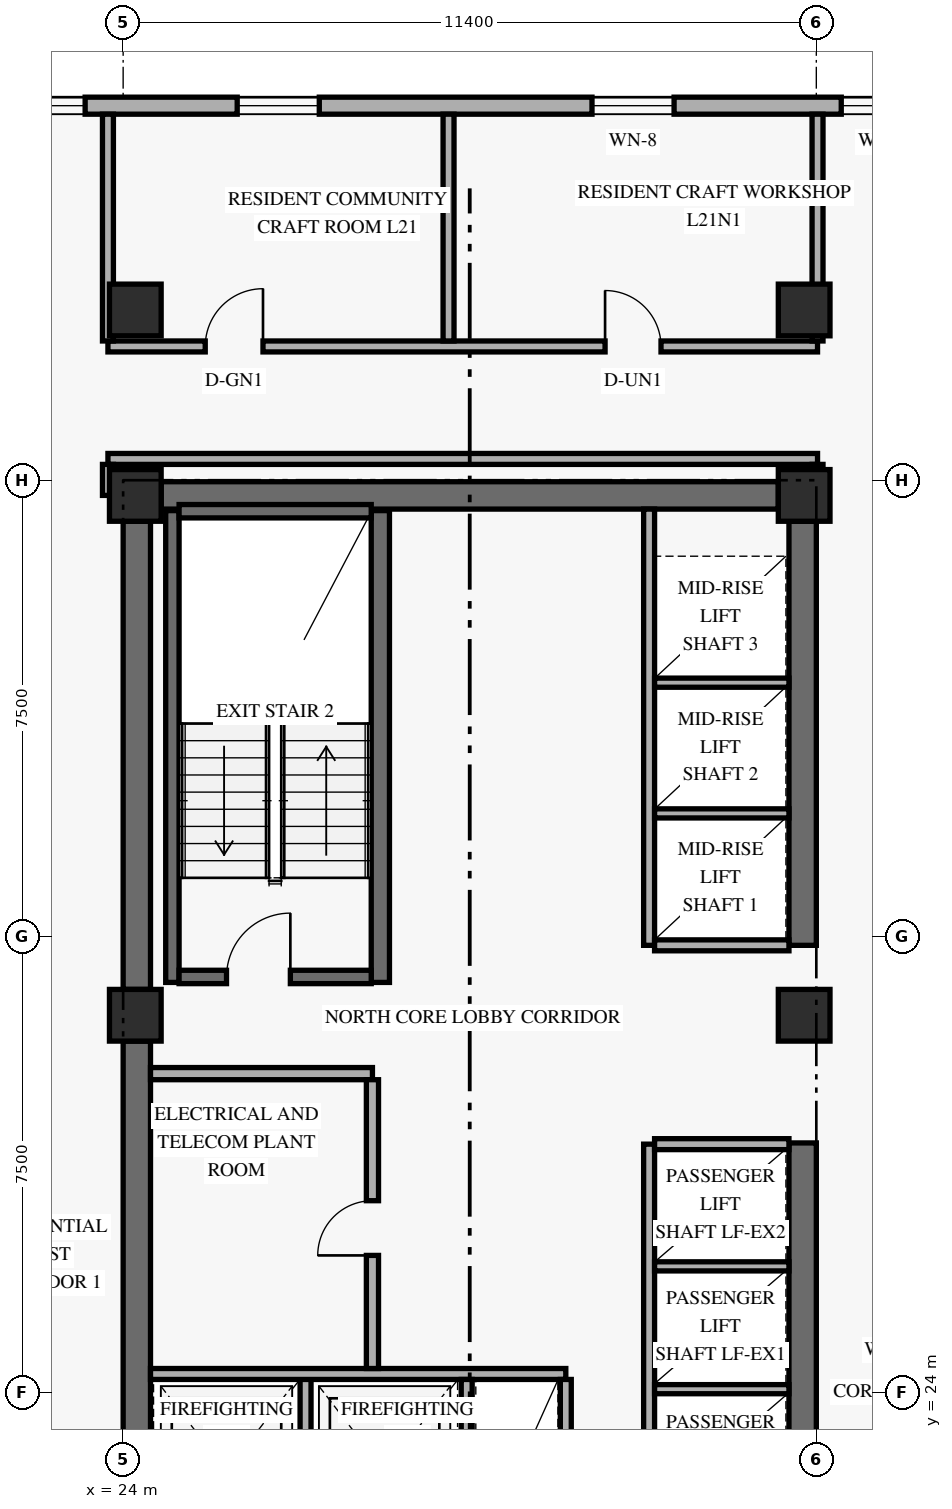
"""IFC4 building model, lengths in metres.
Left out: names, types, materials, properties, quantities, classifications, styles, units other than length and angle.
Written with IfcOpenShell. Run it as: python <this file> out.ifc"""

import sys

from ifc_helpers import new_model, si_unit, direction, frame, frame_2d, origin, origin_2d, place, context, subcontext, project, spatial, rectangle, extrude, element, fill, save


model = new_model("IFC4")
c1 = context("Model", 3, precision=1e-05, world=origin(), true_north=direction((0.0, 1.0)))
c2 = subcontext(c1, "Body", "Model", "MODEL_VIEW")
j1 = project(units=[si_unit("LENGTHUNIT", "METRE"), si_unit("PLANEANGLEUNIT", "RADIAN")], contexts=[c1])
p1 = place(None, origin())
s1 = spatial("IfcSite", under=j1, at=p1, CompositionType="ELEMENT")
p2 = place(p1, origin())
s2 = spatial("IfcBuilding", under=s1, at=p2, CompositionType="ELEMENT")
p3 = place(p2, frame((0.0, 0.0, 84.0)))
s3 = spatial("IfcBuildingStorey", under=s2, at=p3, CompositionType="ELEMENT", Elevation=84.0)
p4 = place(p3, frame((24.225, 17.975, 0.0), z_axis=(0.0, 0.0, 1.0), x_axis=(0.0, 1.0, 0.0)))
e1 = element("IfcWall", 1, at=p4, inside=s3, PredefinedType="SHEAR", context=c2, shape_type="SweptSolid", body=[
    extrude(rectangle(XDim=11.8, YDim=0.45, at=frame_2d((5.9, 0.0))), origin(), (0.0, 0.0, 1.0), 2.749),
])
p5 = place(p3, frame((24.225, 30.625, 0.0), z_axis=(0.0, 0.0, 1.0), x_axis=(0.0, 1.0, 0.0)))
e2 = element("IfcWall", 2, at=p5, inside=s3, PredefinedType="SHEAR", context=c2, shape_type="SweptSolid", body=[
    extrude(rectangle(XDim=7.7, YDim=0.45, at=frame_2d((3.85, 0.0))), origin(), (0.0, 0.0, 1.0), 2.749),
])
p6 = place(p3, frame((35.175, 17.975, 0.0), z_axis=(0.0, 0.0, 1.0), x_axis=(0.0, 1.0, 0.0)))
e3 = element("IfcWall", 3, at=p6, inside=s3, PredefinedType="SHEAR", context=c2, shape_type="SweptSolid", body=[
    extrude(rectangle(XDim=10.125, YDim=0.45, at=frame_2d((5.062, 0.0))), origin(), (0.0, 0.0, 1.0), 2.749),
])
p7 = place(p3, frame((35.175, 31.35, 0.0), z_axis=(0.0, 0.0, 1.0), x_axis=(0.0, 1.0, 0.0)))
e4 = element("IfcWall", 4, at=p7, inside=s3, PredefinedType="SHEAR", context=c2, shape_type="SweptSolid", body=[
    extrude(rectangle(XDim=6.975, YDim=0.45, at=frame_2d((3.487, 0.0))), origin(), (0.0, 0.0, 1.0), 2.749),
])
p8 = place(p3, frame((24.625, 38.75, 0.0), z_axis=(0.0, 0.0, 1.0), x_axis=(1.0, 0.0, 0.0)))
e5 = element("IfcWall", 5, at=p8, inside=s3, PredefinedType="SHEAR", context=c2, shape_type="SweptSolid", body=[
    extrude(rectangle(XDim=10.15, YDim=0.45, at=frame_2d((5.075, 0.0))), origin(), (0.0, 0.0, 1.0), 3.36),
])
p9 = place(p3, frame((24.81, 30.74, 0.0), z_axis=(0.0, 0.0, 1.0), x_axis=(0.0, 1.0, 0.0)))
e6 = element("IfcWall", 6, at=p9, inside=s3, PredefinedType="SHEAR", context=c2, shape_type="SweptSolid", body=[
    extrude(rectangle(XDim=7.76, YDim=0.22, at=frame_2d((3.88, 0.0))), origin(), (0.0, 0.0, 1.0), 3.36),
])
p10 = place(p3, frame((28.23, 30.74, 0.0), z_axis=(0.0, 0.0, 1.0), x_axis=(0.0, 1.0, 0.0)))
e7 = element("IfcWall", 7, at=p10, inside=s3, PredefinedType="SHEAR", context=c2, shape_type="SweptSolid", body=[
    extrude(rectangle(XDim=7.76, YDim=0.3, at=frame_2d((3.88, 0.0))), origin(), (0.0, 0.0, 1.0), 3.36),
])
p11 = place(p3, frame((24.92, 30.83, 0.0), z_axis=(0.0, 0.0, 1.0), x_axis=(1.0, 0.0, 0.0)))
e8 = element("IfcWall", 8, at=p11, inside=s3, PredefinedType="SHEAR", context=c2, shape_type="SweptSolid", body=[
    extrude(rectangle(XDim=3.16, YDim=0.22, at=frame_2d((1.58, 0.0))), origin(), (0.0, 0.0, 1.0), 3.36),
])
p12 = place(p11, frame((0.78, 0.0, 0.0)))
e9 = element("IfcOpeningElement", 9, at=p12, cuts=e8, PredefinedType="OPENING", context=c2, shape_type="SweptSolid", body=[
    extrude(rectangle(XDim=1.05, YDim=2.15, at=frame_2d((0.525, 1.075))), frame((0.0, 0.12, 0.0), z_axis=(0.0, -1.0, 0.0), x_axis=(1.0, 0.0, 0.0)), (0.0, 0.0, 1.0), 0.24),
])
p13 = place(p3, frame((24.92, 38.49, 0.0), z_axis=(0.0, 0.0, 1.0), x_axis=(1.0, 0.0, 0.0)))
e10 = element("IfcWall", 10, at=p13, inside=s3, PredefinedType="SHEAR", context=c2, shape_type="SweptSolid", body=[
    extrude(rectangle(XDim=3.16, YDim=0.22, at=frame_2d((1.58, 0.0))), origin(), (0.0, 0.0, 1.0), 3.36),
])
for number, where, z_axis, x_axis in (
    (11, (24.2, 30.2, 0.0), (0.0, 0.0, 1.0), (1.0, 0.0, 0.0)),
    (12, (24.2, 38.75, 0.0), (0.0, 0.0, 1.0), (1.0, 0.0, 0.0)),
    (13, (24.2, 41.8, 0.0), (0.0, 0.0, 1.0), (1.0, 0.0, 0.0)),
    (14, (35.2, 30.2, 0.0), (0.0, 0.0, 1.0), (1.0, 0.0, 0.0)),
    (15, (35.2, 38.75, 0.0), (0.0, 0.0, 1.0), (1.0, 0.0, 0.0)),
    (16, (35.2, 41.8, 0.0), (0.0, 0.0, 1.0), (1.0, 0.0, 0.0)),
):
    element("IfcColumn", number, at=place(p3, frame(where, z_axis=z_axis, x_axis=x_axis)), inside=s3, PredefinedType="COLUMN", context=c2, shape_type="SweptSolid", body=[
        extrude(rectangle(XDim=0.85, YDim=0.85, at=origin_2d()), origin(), (0.0, 0.0, 1.0), 3.6),
    ])
p14 = place(p3, frame((49.98, 45.16, 0.0), z_axis=(0.0, 0.0, 1.0), x_axis=(-1.0, 0.0, 0.0)))
e17 = element("IfcWall", 17, at=p14, inside=s3, PredefinedType="SOLIDWALL", context=c2, shape_type="SweptSolid", body=[
    extrude(rectangle(XDim=36.56, YDim=0.28, at=frame_2d((18.28, 0.0))), origin(), (0.0, 0.0, 1.0), 3.36),
])
p15 = place(p14, frame((31.14, 0.0, 0.85)))
e18 = element("IfcOpeningElement", 18, at=p15, cuts=e17, PredefinedType="OPENING", context=c2, shape_type="SweptSolid", body=[
    extrude(rectangle(XDim=1.35, YDim=1.55, at=frame_2d((0.675, 0.775))), frame((0.0, 0.15, 0.0), z_axis=(0.0, -1.0, 0.0), x_axis=(1.0, 0.0, 0.0)), (0.0, 0.0, 1.0), 0.3),
])
p16 = place(p14, frame((26.605, 0.0, 0.85)))
e19 = element("IfcOpeningElement", 19, at=p16, cuts=e17, PredefinedType="OPENING", context=c2, shape_type="SweptSolid", body=[
    extrude(rectangle(XDim=1.35, YDim=1.55, at=frame_2d((0.675, 0.775))), frame((0.0, 0.15, 0.0), z_axis=(0.0, -1.0, 0.0), x_axis=(1.0, 0.0, 0.0)), (0.0, 0.0, 1.0), 0.3),
])
p17 = place(p14, frame((22.754, 0.0, 0.85)))
e20 = element("IfcOpeningElement", 20, at=p17, cuts=e17, PredefinedType="OPENING", context=c2, shape_type="SweptSolid", body=[
    extrude(rectangle(XDim=1.35, YDim=1.55, at=frame_2d((0.675, 0.775))), frame((0.0, 0.15, 0.0), z_axis=(0.0, -1.0, 0.0), x_axis=(1.0, 0.0, 0.0)), (0.0, 0.0, 1.0), 0.3),
])
p18 = place(p14, frame((16.919, 0.0, 0.85)))
e21 = element("IfcOpeningElement", 21, at=p18, cuts=e17, PredefinedType="OPENING", context=c2, shape_type="SweptSolid", body=[
    extrude(rectangle(XDim=1.35, YDim=1.55, at=frame_2d((0.675, 0.775))), frame((0.0, 0.15, 0.0), z_axis=(0.0, -1.0, 0.0), x_axis=(1.0, 0.0, 0.0)), (0.0, 0.0, 1.0), 0.3),
])
p19 = place(p14, frame((12.82, 0.0, 0.85)))
e22 = element("IfcOpeningElement", 22, at=p19, cuts=e17, PredefinedType="OPENING", context=c2, shape_type="SweptSolid", body=[
    extrude(rectangle(XDim=1.35, YDim=1.55, at=frame_2d((0.675, 0.775))), frame((0.0, 0.15, 0.0), z_axis=(0.0, -1.0, 0.0), x_axis=(1.0, 0.0, 0.0)), (0.0, 0.0, 1.0), 0.3),
])
p20 = place(p14, frame((7.758, 0.0, 0.85)))
e23 = element("IfcOpeningElement", 23, at=p20, cuts=e17, PredefinedType="OPENING", context=c2, shape_type="SweptSolid", body=[
    extrude(rectangle(XDim=1.35, YDim=1.55, at=frame_2d((0.675, 0.775))), frame((0.0, 0.15, 0.0), z_axis=(0.0, -1.0, 0.0), x_axis=(1.0, 0.0, 0.0)), (0.0, 0.0, 1.0), 0.3),
])
p21 = place(p14, frame((1.542, 0.0, 0.85)))
e24 = element("IfcOpeningElement", 24, at=p21, cuts=e17, PredefinedType="OPENING", context=c2, shape_type="SweptSolid", body=[
    extrude(rectangle(XDim=1.35, YDim=1.55, at=frame_2d((0.675, 0.775))), frame((0.0, 0.15, 0.0), z_axis=(0.0, -1.0, 0.0), x_axis=(1.0, 0.0, 0.0)), (0.0, 0.0, 1.0), 0.3),
])
p22 = place(p3, frame((27.0, 21.19, 0.0), z_axis=(0.0, 0.0, 1.0), x_axis=(0.0, 1.0, 0.0)))
e25 = element("IfcWall", 25, at=p22, inside=s3, PredefinedType="STANDARD", context=c2, shape_type="SweptSolid", body=[
    extrude(rectangle(XDim=3.11, YDim=0.18, at=frame_2d((1.555, 0.0))), origin(), (0.0, 0.0, 1.0), 3.36),
])
p23 = place(p3, frame((24.45, 24.3, 0.0), z_axis=(0.0, 0.0, 1.0), x_axis=(1.0, 0.0, 0.0)))
e26 = element("IfcWall", 26, at=p23, inside=s3, PredefinedType="STANDARD", context=c2, shape_type="SweptSolid", body=[
    extrude(rectangle(XDim=6.83, YDim=0.18, at=frame_2d((3.415, 0.0))), origin(), (0.0, 0.0, 1.0), 3.36),
])
for number, where, z_axis, x_axis in (
    (27, (29.65, 21.19, 0.0), (0.0, 0.0, 1.0), (0.0, 1.0, 0.0)),
    (28, (31.28, 21.19, 0.0), (0.0, 0.0, 1.0), (0.0, 1.0, 0.0)),
):
    element("IfcWall", number, at=place(p3, frame(where, z_axis=z_axis, x_axis=x_axis)), inside=s3, PredefinedType="STANDARD", context=c2, shape_type="SweptSolid", body=[
        extrude(rectangle(XDim=3.02, YDim=0.18, at=frame_2d((1.51, 0.0))), origin(), (0.0, 0.0, 1.0), 3.36),
    ])
p24 = place(p3, frame((24.45, 29.24, 0.0), z_axis=(0.0, 0.0, 1.0), x_axis=(1.0, 0.0, 0.0)))
e29 = element("IfcWall", 29, at=p24, inside=s3, PredefinedType="STANDARD", context=c2, shape_type="SweptSolid", body=[
    extrude(rectangle(XDim=3.65, YDim=0.2, at=frame_2d((1.825, 0.0))), origin(), (0.0, 0.0, 1.0), 3.36),
])
p25 = place(p3, frame((28.1, 24.39, 0.0), z_axis=(0.0, 0.0, 1.0), x_axis=(0.0, 1.0, 0.0)))
e30 = element("IfcWall", 30, at=p25, inside=s3, PredefinedType="STANDARD", context=c2, shape_type="SweptSolid", body=[
    extrude(rectangle(XDim=4.75, YDim=0.2, at=frame_2d((2.375, 0.0))), origin(), (0.0, 0.0, 1.0), 3.36),
])
p26 = place(p25, frame((1.86, 0.0, 0.0)))
e31 = element("IfcOpeningElement", 31, at=p26, cuts=e30, PredefinedType="OPENING", context=c2, shape_type="SweptSolid", body=[
    extrude(rectangle(XDim=0.9, YDim=2.1, at=frame_2d((0.45, 1.05))), frame((0.0, 0.11, 0.0), z_axis=(0.0, -1.0, 0.0), x_axis=(1.0, 0.0, 0.0)), (0.0, 0.0, 1.0), 0.22),
])
p27 = place(p3, frame((32.65, 18.02, 0.0), z_axis=(0.0, 0.0, 1.0), x_axis=(0.0, 1.0, 0.0)))
e32 = element("IfcWall", 32, at=p27, inside=s3, PredefinedType="STANDARD", context=c2, shape_type="SweptSolid", body=[
    extrude(rectangle(XDim=10.06, YDim=0.18, at=frame_2d((5.03, 0.0))), origin(), (0.0, 0.0, 1.0), 3.36),
])
p28 = place(p3, frame((32.74, 28.08, 0.0), z_axis=(0.0, 0.0, 1.0), x_axis=(1.0, 0.0, 0.0)))
e33 = element("IfcWall", 33, at=p28, inside=s3, PredefinedType="STANDARD", context=c2, shape_type="SweptSolid", body=[
    extrude(rectangle(XDim=2.21, YDim=0.18, at=frame_2d((1.105, 0.0))), origin(), (0.0, 0.0, 1.0), 3.36),
])
for number, where, z_axis, x_axis in (
    (34, (32.74, 24.05, 0.0), (0.0, 0.0, 1.0), (1.0, 0.0, 0.0)),
    (35, (32.74, 26.07, 0.0), (0.0, 0.0, 1.0), (1.0, 0.0, 0.0)),
):
    element("IfcWall", number, at=place(p3, frame(where, z_axis=z_axis, x_axis=x_axis)), inside=s3, PredefinedType="STANDARD", context=c2, shape_type="SweptSolid", body=[
        extrude(rectangle(XDim=2.21, YDim=0.15, at=frame_2d((1.105, 0.0))), origin(), (0.0, 0.0, 1.0), 3.36),
    ])
p29 = place(p3, frame((32.65, 31.35, 0.0), z_axis=(0.0, 0.0, 1.0), x_axis=(0.0, 1.0, 0.0)))
e36 = element("IfcWall", 36, at=p29, inside=s3, PredefinedType="STANDARD", context=c2, shape_type="SweptSolid", body=[
    extrude(rectangle(XDim=7.175, YDim=0.18, at=frame_2d((3.587, 0.0))), origin(), (0.0, 0.0, 1.0), 3.36),
])
p30 = place(p3, frame((32.74, 31.35, 0.0), z_axis=(0.0, 0.0, 1.0), x_axis=(1.0, 0.0, 0.0)))
e37 = element("IfcWall", 37, at=p30, inside=s3, PredefinedType="STANDARD", context=c2, shape_type="SweptSolid", body=[
    extrude(rectangle(XDim=2.21, YDim=0.18, at=frame_2d((1.105, 0.0))), origin(), (0.0, 0.0, 1.0), 3.36),
])
for number, where, z_axis, x_axis in (
    (38, (32.74, 33.52, 0.0), (0.0, 0.0, 1.0), (1.0, 0.0, 0.0)),
    (39, (32.74, 35.67, 0.0), (0.0, 0.0, 1.0), (1.0, 0.0, 0.0)),
):
    element("IfcWall", number, at=place(p3, frame(where, z_axis=z_axis, x_axis=x_axis)), inside=s3, PredefinedType="STANDARD", context=c2, shape_type="SweptSolid", body=[
        extrude(rectangle(XDim=2.21, YDim=0.15, at=frame_2d((1.105, 0.0))), origin(), (0.0, 0.0, 1.0), 3.36),
    ])
p31 = place(p3, frame((23.75, 41.2, 0.0), z_axis=(0.0, 0.0, 1.0), x_axis=(1.0, 0.0, 0.0)))
e40 = element("IfcWall", 40, at=p31, inside=s3, PredefinedType="STANDARD", context=c2, shape_type="SweptSolid", body=[
    extrude(rectangle(XDim=11.67, YDim=0.18, at=frame_2d((5.835, 0.0))), origin(), (0.0, 0.0, 1.0), 2.731),
])
p32 = place(p31, frame((1.6, 0.0, 0.0)))
e41 = element("IfcOpeningElement", 41, at=p32, cuts=e40, PredefinedType="OPENING", context=c2, shape_type="SweptSolid", body=[
    extrude(rectangle(XDim=0.95, YDim=2.15, at=frame_2d((0.475, 1.075))), frame((0.0, 0.1, 0.0), z_axis=(0.0, -1.0, 0.0), x_axis=(1.0, 0.0, 0.0)), (0.0, 0.0, 1.0), 0.2),
])
p33 = place(p31, frame((8.176, 0.0, 0.0)))
e42 = element("IfcOpeningElement", 42, at=p33, cuts=e40, PredefinedType="OPENING", context=c2, shape_type="SweptSolid", body=[
    extrude(rectangle(XDim=0.92, YDim=2.15, at=frame_2d((0.46, 1.075))), frame((0.0, 0.1, 0.0), z_axis=(0.0, -1.0, 0.0), x_axis=(1.0, 0.0, 0.0)), (0.0, 0.0, 1.0), 0.2),
])
p34 = place(p3, frame((23.75, 39.35, 0.0), z_axis=(0.0, 0.0, 1.0), x_axis=(1.0, 0.0, 0.0)))
e43 = element("IfcWall", 43, at=p34, inside=s3, PredefinedType="STANDARD", context=c2, shape_type="SweptSolid", body=[
    extrude(rectangle(XDim=11.67, YDim=0.18, at=frame_2d((5.835, 0.0))), origin(), (0.0, 0.0, 1.0), 2.731),
])
p35 = place(p3, frame((35.42, 38.75, 0.0), z_axis=(0.0, 0.0, 1.0), x_axis=(0.0, 1.0, 0.0)))
e44 = element("IfcWall", 44, at=p35, inside=s3, PredefinedType="STANDARD", context=c2, shape_type="SweptSolid", body=[
    extrude(rectangle(XDim=0.51, YDim=0.18, at=frame_2d((0.255, 0.0))), origin(), (0.0, 0.0, 1.0), 2.731),
])
p36 = place(p3, frame((35.42, 41.29, 0.0), z_axis=(0.0, 0.0, 1.0), x_axis=(0.0, 1.0, 0.0)))
e45 = element("IfcWall", 45, at=p36, inside=s3, PredefinedType="PARTITIONING", context=c2, shape_type="SweptSolid", body=[
    extrude(rectangle(XDim=3.73, YDim=0.18, at=frame_2d((1.865, 0.0))), origin(), (0.0, 0.0, 1.0), 2.731),
])
p37 = place(p3, frame((23.75, 38.75, 0.0), z_axis=(0.0, 0.0, 1.0), x_axis=(0.0, 1.0, 0.0)))
e46 = element("IfcWall", 46, at=p37, inside=s3, PredefinedType="STANDARD", context=c2, shape_type="SweptSolid", body=[
    extrude(rectangle(XDim=0.51, YDim=0.18, at=frame_2d((0.255, 0.0))), origin(), (0.0, 0.0, 1.0), 2.731),
])
for number, where, z_axis, x_axis in (
    (47, (23.75, 41.29, 0.0), (0.0, 0.0, 1.0), (0.0, 1.0, 0.0)),
    (48, (29.352, 41.29, 0.0), (0.0, 0.0, 1.0), (0.0, 1.0, 0.0)),
):
    element("IfcWall", number, at=place(p3, frame(where, z_axis=z_axis, x_axis=x_axis)), inside=s3, PredefinedType="PARTITIONING", context=c2, shape_type="SweptSolid", body=[
        extrude(rectangle(XDim=3.73, YDim=0.18, at=frame_2d((1.865, 0.0))), origin(), (0.0, 0.0, 1.0), 2.809),
    ])
p38 = place(p16, origin())
e49 = element("IfcWindow", 49, at=p38, inside=s3, PartitioningType="SINGLE_PANEL", PredefinedType="WINDOW", context=c2, shape_type="SweptSolid", body=[
    extrude(rectangle(XDim=1.35, YDim=1.55, at=frame_2d((0.675, 0.775))), frame((0.0, 0.03, 0.0), z_axis=(0.0, -1.0, 0.0), x_axis=(1.0, 0.0, 0.0)), (0.0, 0.0, 1.0), 0.06),
])
fill(e19, e49)
p39 = place(p17, origin())
e50 = element("IfcWindow", 50, at=p39, inside=s3, PartitioningType="SINGLE_PANEL", PredefinedType="WINDOW", context=c2, shape_type="SweptSolid", body=[
    extrude(rectangle(XDim=1.35, YDim=1.55, at=frame_2d((0.675, 0.775))), frame((0.0, 0.03, 0.0), z_axis=(0.0, -1.0, 0.0), x_axis=(1.0, 0.0, 0.0)), (0.0, 0.0, 1.0), 0.06),
])
fill(e20, e50)
p40 = place(p18, origin())
e51 = element("IfcWindow", 51, at=p40, inside=s3, PartitioningType="SINGLE_PANEL", PredefinedType="WINDOW", context=c2, shape_type="SweptSolid", body=[
    extrude(rectangle(XDim=1.35, YDim=1.55, at=frame_2d((0.675, 0.775))), frame((0.0, 0.03, 0.0), z_axis=(0.0, -1.0, 0.0), x_axis=(1.0, 0.0, 0.0)), (0.0, 0.0, 1.0), 0.06),
])
fill(e21, e51)
p41 = place(p19, origin())
e52 = element("IfcWindow", 52, at=p41, inside=s3, PartitioningType="SINGLE_PANEL", PredefinedType="WINDOW", context=c2, shape_type="SweptSolid", body=[
    extrude(rectangle(XDim=1.35, YDim=1.55, at=frame_2d((0.675, 0.775))), frame((0.0, 0.03, 0.0), z_axis=(0.0, -1.0, 0.0), x_axis=(1.0, 0.0, 0.0)), (0.0, 0.0, 1.0), 0.06),
])
fill(e22, e52)
p42 = place(p12, origin())
e53 = element("IfcDoor", 53, at=p42, inside=s3, OperationType="SINGLE_SWING_RIGHT", PredefinedType="DOOR", context=c2, shape_type="SweptSolid", body=[
    extrude(rectangle(XDim=1.05, YDim=2.15, at=frame_2d((0.525, 1.075))), frame((0.0, 0.025, 0.0), z_axis=(0.0, -1.0, 0.0), x_axis=(1.0, 0.0, 0.0)), (0.0, 0.0, 1.0), 0.05),
])
fill(e9, e53)
p43 = place(p26, origin())
e54 = element("IfcDoor", 54, at=p43, inside=s3, OperationType="SINGLE_SWING_LEFT", PredefinedType="DOOR", context=c2, shape_type="SweptSolid", body=[
    extrude(rectangle(XDim=0.9, YDim=2.1, at=frame_2d((0.45, 1.05))), frame((0.0, 0.025, 0.0), z_axis=(0.0, -1.0, 0.0), x_axis=(1.0, 0.0, 0.0)), (0.0, 0.0, 1.0), 0.05),
])
fill(e31, e54)
p44 = place(p32, origin())
e55 = element("IfcDoor", 55, at=p44, inside=s3, OperationType="SINGLE_SWING_RIGHT", PredefinedType="DOOR", context=c2, shape_type="SweptSolid", body=[
    extrude(rectangle(XDim=0.95, YDim=2.15, at=frame_2d((0.475, 1.075))), frame((0.0, 0.025, 0.0), z_axis=(0.0, -1.0, 0.0), x_axis=(1.0, 0.0, 0.0)), (0.0, 0.0, 1.0), 0.05),
])
fill(e41, e55)
p45 = place(p33, origin())
e56 = element("IfcDoor", 56, at=p45, inside=s3, OperationType="SINGLE_SWING_LEFT", PredefinedType="DOOR", context=c2, shape_type="SweptSolid", body=[
    extrude(rectangle(XDim=0.92, YDim=2.15, at=frame_2d((0.46, 1.075))), frame((0.0, 0.025, 0.0), z_axis=(0.0, -1.0, 0.0), x_axis=(1.0, 0.0, 0.0)), (0.0, 0.0, 1.0), 0.05),
])
fill(e42, e56)
save(model, sys.argv[1])
